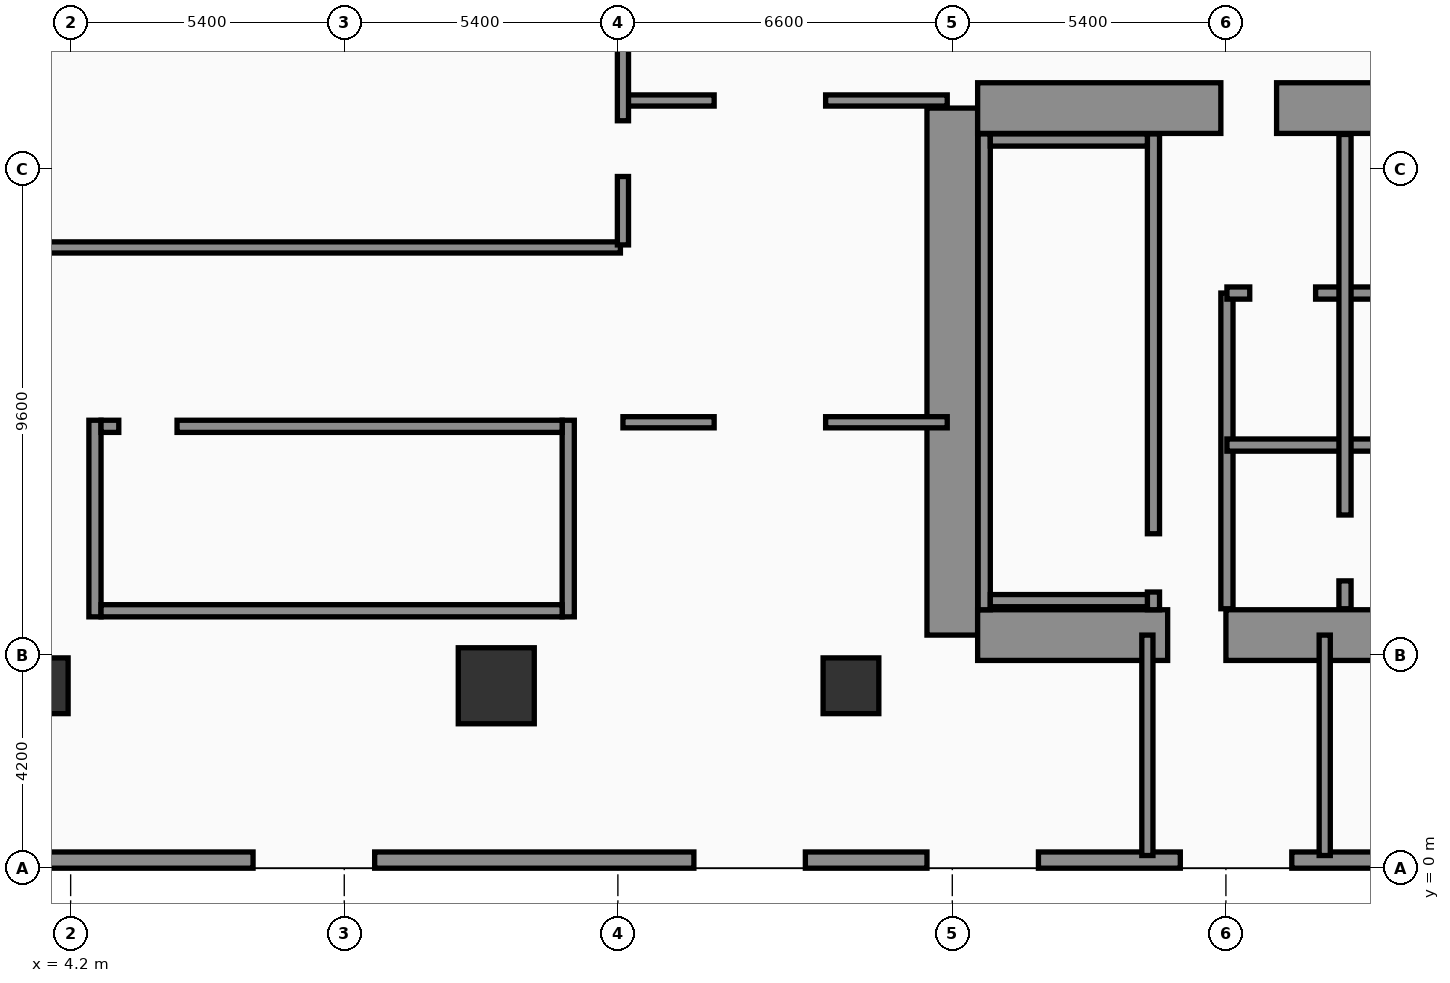
"""IFC4 building model, lengths in metres.
Left out: names, types, materials, properties, quantities, classifications, styles, units other than length and angle.
Written with IfcOpenShell. Run it as: python <this file> out.ifc"""

import sys

from ifc_helpers import new_model, si_unit, direction, frame, frame_2d, origin, origin_2d, place, context, subcontext, project, spatial, rectangle, hollow_rectangle, extrude, element, fill, save


model = new_model("IFC4")
c1 = context("Model", 3, precision=1e-05, world=origin(), true_north=direction((0.0, 1.0)))
c2 = subcontext(c1, "Body", "Model", "MODEL_VIEW")
j1 = project(units=[si_unit("LENGTHUNIT", "METRE"), si_unit("PLANEANGLEUNIT", "RADIAN")], contexts=[c1])
p1 = place(None, origin())
s1 = spatial("IfcSite", under=j1, at=p1, CompositionType="ELEMENT")
p2 = place(p1, origin())
s2 = spatial("IfcBuilding", under=s1, at=p2, CompositionType="ELEMENT")
p3 = place(p2, origin())
s3 = spatial("IfcBuildingStorey", under=s2, at=p3, CompositionType="ELEMENT", Elevation=0.0)
p4 = place(p3, frame((21.6, 4.6, 0.0), z_axis=(0.0, 0.0, 1.0), x_axis=(0.0, 1.0, 0.0)))
e1 = element("IfcWall", 1, at=p4, inside=s3, PredefinedType="SHEAR", context=c2, shape_type="SweptSolid", body=[
    extrude(rectangle(XDim=10.4, YDim=1.0, at=frame_2d((5.2, 0.0))), origin(), (0.0, 0.0, 1.0), 5.68),
])
p5 = place(p3, frame((22.1, 15.0, 0.0), z_axis=(0.0, 0.0, 1.0), x_axis=(1.0, 0.0, 0.0)))
e2 = element("IfcWall", 2, at=p5, inside=s3, PredefinedType="SHEAR", context=c2, shape_type="SweptSolid", body=[
    extrude(rectangle(XDim=9.8, YDim=1.0, at=frame_2d((4.9, 0.0))), origin(), (0.0, 0.0, 1.0), 5.68),
])
p6 = place(p5, frame((4.8, 0.0, 0.0)))
e3 = element("IfcOpeningElement", 3, at=p6, cuts=e2, PredefinedType="OPENING", context=c2, shape_type="SweptSolid", body=[
    extrude(rectangle(XDim=1.1, YDim=2.2, at=frame_2d((0.55, 1.1))), frame((0.0, 0.51, 0.0), z_axis=(0.0, -1.0, 0.0), x_axis=(1.0, 0.0, 0.0)), (0.0, 0.0, 1.0), 1.02),
])
p7 = place(p5, frame((7.95, 0.0, 0.0)))
e4 = element("IfcOpeningElement", 4, at=p7, cuts=e2, PredefinedType="OPENING", context=c2, shape_type="SweptSolid", body=[
    extrude(rectangle(XDim=1.3, YDim=2.35, at=frame_2d((0.65, 1.175))), frame((0.0, 0.51, 0.0), z_axis=(0.0, -1.0, 0.0), x_axis=(1.0, 0.0, 0.0)), (0.0, 0.0, 1.0), 1.02),
])
p8 = place(p3, frame((22.1, 4.6, 0.0), z_axis=(0.0, 0.0, 1.0), x_axis=(1.0, 0.0, 0.0)))
e5 = element("IfcWall", 5, at=p8, inside=s3, PredefinedType="SHEAR", context=c2, shape_type="SweptSolid", body=[
    extrude(rectangle(XDim=9.8, YDim=1.0, at=frame_2d((4.9, 0.0))), origin(), (0.0, 0.0, 1.0), 5.68),
])
p9 = place(p8, frame((3.75, 0.0, 0.0)))
e6 = element("IfcOpeningElement", 6, at=p9, cuts=e5, PredefinedType="OPENING", context=c2, shape_type="SweptSolid", body=[
    extrude(rectangle(XDim=1.15, YDim=2.2, at=frame_2d((0.575, 1.1))), frame((0.0, 0.51, 0.0), z_axis=(0.0, -1.0, 0.0), x_axis=(1.0, 0.0, 0.0)), (0.0, 0.0, 1.0), 1.02),
])
p10 = place(p3, frame((22.23, 5.1, 0.0), z_axis=(0.0, 0.0, 1.0), x_axis=(0.0, 1.0, 0.0)))
e7 = element("IfcWall", 7, at=p10, inside=s3, PredefinedType="SOLIDWALL", context=c2, shape_type="SweptSolid", body=[
    extrude(rectangle(XDim=9.39, YDim=0.24, at=frame_2d((4.695, 0.0))), origin(), (0.0, 0.0, 1.0), 5.68),
])
p11 = place(p3, frame((25.57, 5.1, 0.0), z_axis=(0.0, 0.0, 1.0), x_axis=(0.0, 1.0, 0.0)))
e8 = element("IfcWall", 8, at=p11, inside=s3, PredefinedType="SOLIDWALL", context=c2, shape_type="SweptSolid", body=[
    extrude(rectangle(XDim=9.39, YDim=0.24, at=frame_2d((4.695, 0.0))), origin(), (0.0, 0.0, 1.0), 5.68),
])
p12 = place(p11, frame((0.35, 0.0, 0.0)))
e9 = element("IfcOpeningElement", 9, at=p12, cuts=e8, PredefinedType="OPENING", context=c2, shape_type="SweptSolid", body=[
    extrude(rectangle(XDim=1.15, YDim=2.2, at=frame_2d((0.575, 1.1))), frame((0.0, 0.13, 0.0), z_axis=(0.0, -1.0, 0.0), x_axis=(1.0, 0.0, 0.0)), (0.0, 0.0, 1.0), 0.26),
])
for number, where, z_axis, x_axis in (
    (10, (22.35, 5.28, 0.0), (0.0, 0.0, 1.0), (1.0, 0.0, 0.0)),
    (11, (22.35, 14.37, 0.0), (0.0, 0.0, 1.0), (1.0, 0.0, 0.0)),
):
    element("IfcWall", number, at=place(p3, frame(where, z_axis=z_axis, x_axis=x_axis)), inside=s3, PredefinedType="SOLIDWALL", context=c2, shape_type="SweptSolid", body=[
        extrude(rectangle(XDim=3.1, YDim=0.24, at=frame_2d((1.55, 0.0))), origin(), (0.0, 0.0, 1.0), 5.68),
    ])
for number, where, z_axis, x_axis in (
    (12, (4.68, 4.96, 0.0), (0.0, 0.0, 1.0), (0.0, 1.0, 0.0)),
    (13, (14.02, 4.96, 0.0), (0.0, 0.0, 1.0), (0.0, 1.0, 0.0)),
):
    element("IfcWall", number, at=place(p3, frame(where, z_axis=z_axis, x_axis=x_axis)), inside=s3, PredefinedType="SOLIDWALL", context=c2, shape_type="SweptSolid", body=[
        extrude(rectangle(XDim=3.88, YDim=0.24, at=frame_2d((1.94, 0.0))), origin(), (0.0, 0.0, 1.0), 5.68),
    ])
p13 = place(p3, frame((4.8, 5.08, 0.0), z_axis=(0.0, 0.0, 1.0), x_axis=(1.0, 0.0, 0.0)))
e14 = element("IfcWall", 14, at=p13, inside=s3, PredefinedType="SOLIDWALL", context=c2, shape_type="SweptSolid", body=[
    extrude(rectangle(XDim=9.1, YDim=0.24, at=frame_2d((4.55, 0.0))), origin(), (0.0, 0.0, 1.0), 5.68),
])
p14 = place(p3, frame((4.8, 8.72, 0.0), z_axis=(0.0, 0.0, 1.0), x_axis=(1.0, 0.0, 0.0)))
e15 = element("IfcWall", 15, at=p14, inside=s3, PredefinedType="SOLIDWALL", context=c2, shape_type="SweptSolid", body=[
    extrude(rectangle(XDim=9.1, YDim=0.24, at=frame_2d((4.55, 0.0))), origin(), (0.0, 0.0, 1.0), 5.68),
])
p15 = place(p14, frame((0.35, 0.0, 0.0)))
e16 = element("IfcOpeningElement", 16, at=p15, cuts=e15, PredefinedType="OPENING", context=c2, shape_type="SweptSolid", body=[
    extrude(rectangle(XDim=1.15, YDim=2.2, at=frame_2d((0.575, 1.1))), frame((0.0, 0.13, 0.0), z_axis=(0.0, -1.0, 0.0), x_axis=(1.0, 0.0, 0.0)), (0.0, 0.0, 1.0), 0.26),
])
p16 = place(p3, frame((3.6, 3.6, 0.0), z_axis=(0.0, 0.0, 1.0), x_axis=(1.0, 0.0, 0.0)))
e17 = element("IfcColumn", 17, at=p16, inside=s3, PredefinedType="COLUMN", context=c2, shape_type="SweptSolid", body=[
    extrude(hollow_rectangle(XDim=1.1, YDim=1.1, WallThickness=0.045, at=origin_2d()), origin(), (0.0, 0.0, 1.0), 5.68),
])
p17 = place(p3, frame((12.6, 3.6, 0.0), z_axis=(0.0, 0.0, 1.0), x_axis=(1.0, 0.0, 0.0)))
e18 = element("IfcColumn", 18, at=p17, inside=s3, PredefinedType="COLUMN", context=c2, shape_type="SweptSolid", body=[
    extrude(rectangle(XDim=1.5, YDim=1.5, at=origin_2d()), origin(), (0.0, 0.0, 1.0), 5.68),
])
p18 = place(p3, frame((19.6, 3.6, 0.0), z_axis=(0.0, 0.0, 1.0), x_axis=(1.0, 0.0, 0.0)))
e19 = element("IfcColumn", 19, at=p18, inside=s3, PredefinedType="COLUMN", context=c2, shape_type="SweptSolid", body=[
    extrude(hollow_rectangle(XDim=1.1, YDim=1.1, WallThickness=0.045, at=origin_2d()), origin(), (0.0, 0.0, 1.0), 5.68),
])
p19 = place(p3, frame((81.7, 0.16, 0.0), z_axis=(0.0, 0.0, 1.0), x_axis=(-1.0, 0.0, 0.0)))
e20 = element("IfcWall", 20, at=p19, inside=s3, PredefinedType="SOLIDWALL", context=c2, shape_type="SweptSolid", body=[
    extrude(rectangle(XDim=79.4, YDim=0.32, at=frame_2d((39.7, 0.0))), origin(), (0.0, 0.0, 1.0), 5.68),
])
p20 = place(p19, frame((63.0, 0.0, 0.0)))
e21 = element("IfcOpeningElement", 21, at=p20, cuts=e20, PredefinedType="OPENING", context=c2, shape_type="SweptSolid", body=[
    extrude(rectangle(XDim=2.2, YDim=2.5, at=frame_2d((1.1, 1.25))), frame((0.0, 0.17, 0.0), z_axis=(0.0, -1.0, 0.0), x_axis=(1.0, 0.0, 0.0)), (0.0, 0.0, 1.0), 0.34),
])
p21 = place(p19, frame((58.4, 0.0, 0.0)))
e22 = element("IfcOpeningElement", 22, at=p21, cuts=e20, PredefinedType="OPENING", context=c2, shape_type="SweptSolid", body=[
    extrude(rectangle(XDim=2.2, YDim=2.5, at=frame_2d((1.1, 1.25))), frame((0.0, 0.17, 0.0), z_axis=(0.0, -1.0, 0.0), x_axis=(1.0, 0.0, 0.0)), (0.0, 0.0, 1.0), 0.34),
])
p22 = place(p19, frame((53.4, 0.0, 0.0)))
e23 = element("IfcOpeningElement", 23, at=p22, cuts=e20, PredefinedType="OPENING", context=c2, shape_type="SweptSolid", body=[
    extrude(rectangle(XDim=2.2, YDim=2.5, at=frame_2d((1.1, 1.25))), frame((0.0, 0.17, 0.0), z_axis=(0.0, -1.0, 0.0), x_axis=(1.0, 0.0, 0.0)), (0.0, 0.0, 1.0), 0.34),
])
p23 = place(p19, frame((47.0, 0.0, 0.0)))
e24 = element("IfcOpeningElement", 24, at=p23, cuts=e20, PredefinedType="OPENING", context=c2, shape_type="SweptSolid", body=[
    extrude(rectangle(XDim=2.2, YDim=2.5, at=frame_2d((1.1, 1.25))), frame((0.0, 0.17, 0.0), z_axis=(0.0, -1.0, 0.0), x_axis=(1.0, 0.0, 0.0)), (0.0, 0.0, 1.0), 0.34),
])
p24 = place(p19, frame((41.7, 0.0, 0.0)))
e25 = element("IfcOpeningElement", 25, at=p24, cuts=e20, PredefinedType="OPENING", context=c2, shape_type="SweptSolid", body=[
    extrude(rectangle(XDim=2.2, YDim=2.5, at=frame_2d((1.1, 1.25))), frame((0.0, 0.17, 0.0), z_axis=(0.0, -1.0, 0.0), x_axis=(1.0, 0.0, 0.0)), (0.0, 0.0, 1.0), 0.34),
])
p25 = place(p19, frame((36.0, 0.0, 0.0)))
e26 = element("IfcOpeningElement", 26, at=p25, cuts=e20, PredefinedType="OPENING", context=c2, shape_type="SweptSolid", body=[
    extrude(rectangle(XDim=2.2, YDim=2.5, at=frame_2d((1.1, 1.25))), frame((0.0, 0.17, 0.0), z_axis=(0.0, -1.0, 0.0), x_axis=(1.0, 0.0, 0.0)), (0.0, 0.0, 1.0), 0.34),
])
p26 = place(p19, frame((30.2, 0.0, 0.0)))
e27 = element("IfcOpeningElement", 27, at=p26, cuts=e20, PredefinedType="OPENING", context=c2, shape_type="SweptSolid", body=[
    extrude(rectangle(XDim=2.2, YDim=2.5, at=frame_2d((1.1, 1.25))), frame((0.0, 0.17, 0.0), z_axis=(0.0, -1.0, 0.0), x_axis=(1.0, 0.0, 0.0)), (0.0, 0.0, 1.0), 0.34),
])
p27 = place(p19, frame((24.7, 0.0, 0.0)))
e28 = element("IfcOpeningElement", 28, at=p27, cuts=e20, PredefinedType="OPENING", context=c2, shape_type="SweptSolid", body=[
    extrude(rectangle(XDim=2.2, YDim=2.5, at=frame_2d((1.1, 1.25))), frame((0.0, 0.17, 0.0), z_axis=(0.0, -1.0, 0.0), x_axis=(1.0, 0.0, 0.0)), (0.0, 0.0, 1.0), 0.34),
])
p28 = place(p19, frame((71.5, 0.0, 0.8)))
e29 = element("IfcOpeningElement", 29, at=p28, cuts=e20, PredefinedType="OPENING", context=c2, shape_type="SweptSolid", body=[
    extrude(rectangle(XDim=2.4, YDim=2.6, at=frame_2d((1.2, 1.3))), frame((0.0, 0.17, 0.0), z_axis=(0.0, -1.0, 0.0), x_axis=(1.0, 0.0, 0.0)), (0.0, 0.0, 1.0), 0.34),
])
p29 = place(p19, frame((16.5, 0.0, 0.8)))
e30 = element("IfcOpeningElement", 30, at=p29, cuts=e20, PredefinedType="OPENING", context=c2, shape_type="SweptSolid", body=[
    extrude(rectangle(XDim=2.4, YDim=2.6, at=frame_2d((1.2, 1.3))), frame((0.0, 0.17, 0.0), z_axis=(0.0, -1.0, 0.0), x_axis=(1.0, 0.0, 0.0)), (0.0, 0.0, 1.0), 0.34),
])
p30 = place(p19, frame((7.0, 0.0, 0.8)))
e31 = element("IfcOpeningElement", 31, at=p30, cuts=e20, PredefinedType="OPENING", context=c2, shape_type="SweptSolid", body=[
    extrude(rectangle(XDim=2.4, YDim=2.6, at=frame_2d((1.2, 1.3))), frame((0.0, 0.17, 0.0), z_axis=(0.0, -1.0, 0.0), x_axis=(1.0, 0.0, 0.0)), (0.0, 0.0, 1.0), 0.34),
])
p31 = place(p3, frame((27.02, 5.12, 0.0), z_axis=(0.0, 0.0, 1.0), x_axis=(0.0, 1.0, 0.0)))
e32 = element("IfcWall", 32, at=p31, inside=s3, PredefinedType="SOLIDWALL", context=c2, shape_type="SweptSolid", body=[
    extrude(rectangle(XDim=6.23, YDim=0.24, at=frame_2d((3.115, 0.0))), origin(), (0.0, 0.0, 1.0), 5.68),
])
p32 = place(p3, frame((27.02, 11.35, 0.0), z_axis=(0.0, 0.0, 1.0), x_axis=(1.0, 0.0, 0.0)))
e33 = element("IfcWall", 33, at=p32, inside=s3, PredefinedType="SOLIDWALL", context=c2, shape_type="SweptSolid", body=[
    extrude(rectangle(XDim=4.86, YDim=0.24, at=frame_2d((2.43, 0.0))), origin(), (0.0, 0.0, 1.0), 5.68),
])
p33 = place(p32, frame((0.45, 0.0, 0.0)))
e34 = element("IfcOpeningElement", 34, at=p33, cuts=e33, PredefinedType="OPENING", context=c2, shape_type="SweptSolid", body=[
    extrude(rectangle(XDim=1.3, YDim=2.35, at=frame_2d((0.65, 1.175))), frame((0.0, 0.13, 0.0), z_axis=(0.0, -1.0, 0.0), x_axis=(1.0, 0.0, 0.0)), (0.0, 0.0, 1.0), 0.26),
])
p34 = place(p3, frame((27.02, 8.35, 0.0), z_axis=(0.0, 0.0, 1.0), x_axis=(1.0, 0.0, 0.0)))
e35 = element("IfcWall", 35, at=p34, inside=s3, PredefinedType="SOLIDWALL", context=c2, shape_type="SweptSolid", body=[
    extrude(rectangle(XDim=4.86, YDim=0.24, at=frame_2d((2.43, 0.0))), origin(), (0.0, 0.0, 1.0), 5.68),
])
p35 = place(p3, frame((29.35, 5.12, 0.0), z_axis=(0.0, 0.0, 1.0), x_axis=(0.0, 1.0, 0.0)))
e36 = element("IfcWall", 36, at=p35, inside=s3, PredefinedType="SOLIDWALL", context=c2, shape_type="SweptSolid", body=[
    extrude(rectangle(XDim=9.36, YDim=0.24, at=frame_2d((4.68, 0.0))), origin(), (0.0, 0.0, 1.0), 5.68),
])
p36 = place(p35, frame((0.55, 0.0, 0.0)))
e37 = element("IfcOpeningElement", 37, at=p36, cuts=e36, PredefinedType="OPENING", context=c2, shape_type="SweptSolid", body=[
    extrude(rectangle(XDim=1.3, YDim=2.35, at=frame_2d((0.65, 1.175))), frame((0.0, 0.13, 0.0), z_axis=(0.0, -1.0, 0.0), x_axis=(1.0, 0.0, 0.0)), (0.0, 0.0, 1.0), 0.26),
])
p37 = place(p3, frame((0.06, 12.25, 0.0), z_axis=(0.0, 0.0, 1.0), x_axis=(1.0, 0.0, 0.0)))
e38 = element("IfcWall", 38, at=p37, inside=s3, PredefinedType="SOLIDWALL", context=c2, shape_type="SweptSolid", body=[
    extrude(rectangle(XDim=14.99, YDim=0.22, at=frame_2d((7.495, 0.0))), origin(), (0.0, 0.0, 1.0), 4.88),
])
p38 = place(p3, frame((15.1, 15.15, 0.0), z_axis=(0.0, 0.0, 1.0), x_axis=(1.0, 0.0, 0.0)))
e39 = element("IfcWall", 39, at=p38, inside=s3, PredefinedType="SOLIDWALL", context=c2, shape_type="SweptSolid", body=[
    extrude(rectangle(XDim=6.4, YDim=0.22, at=frame_2d((3.2, 0.0))), origin(), (0.0, 0.0, 1.0), 4.48),
])
p39 = place(p38, frame((1.8, 0.0, 0.0)))
e40 = element("IfcOpeningElement", 40, at=p39, cuts=e39, PredefinedType="OPENING", context=c2, shape_type="SweptSolid", body=[
    extrude(rectangle(XDim=2.2, YDim=2.5, at=frame_2d((1.1, 1.25))), frame((0.0, 0.12, 0.0), z_axis=(0.0, -1.0, 0.0), x_axis=(1.0, 0.0, 0.0)), (0.0, 0.0, 1.0), 0.24),
])
p40 = place(p3, frame((15.1, 8.8, 0.0), z_axis=(0.0, 0.0, 1.0), x_axis=(1.0, 0.0, 0.0)))
e41 = element("IfcWall", 41, at=p40, inside=s3, PredefinedType="SOLIDWALL", context=c2, shape_type="SweptSolid", body=[
    extrude(rectangle(XDim=6.4, YDim=0.22, at=frame_2d((3.2, 0.0))), origin(), (0.0, 0.0, 1.0), 5.68),
])
p41 = place(p40, frame((1.8, 0.0, 0.0)))
e42 = element("IfcOpeningElement", 42, at=p41, cuts=e41, PredefinedType="OPENING", context=c2, shape_type="SweptSolid", body=[
    extrude(rectangle(XDim=2.2, YDim=2.5, at=frame_2d((1.1, 1.25))), frame((0.0, 0.12, 0.0), z_axis=(0.0, -1.0, 0.0), x_axis=(1.0, 0.0, 0.0)), (0.0, 0.0, 1.0), 0.24),
])
for number, where, z_axis, x_axis in (
    (43, (25.45, 0.25, 0.0), (0.0, 0.0, 1.0), (0.0, 1.0, 0.0)),
    (44, (28.95, 0.25, 0.0), (0.0, 0.0, 1.0), (0.0, 1.0, 0.0)),
):
    element("IfcWall", number, at=place(p3, frame(where, z_axis=z_axis, x_axis=x_axis)), inside=s3, PredefinedType="SOLIDWALL", context=c2, shape_type="SweptSolid", body=[
        extrude(rectangle(XDim=4.35, YDim=0.22, at=frame_2d((2.175, 0.0))), origin(), (0.0, 0.0, 1.0), 5.18),
    ])
p42 = place(p3, frame((15.1, 12.3, 0.0), z_axis=(0.0, 0.0, 1.0), x_axis=(0.0, 1.0, 0.0)))
e45 = element("IfcWall", 45, at=p42, inside=s3, PredefinedType="SOLIDWALL", context=c2, shape_type="SweptSolid", body=[
    extrude(rectangle(XDim=4.3, YDim=0.22, at=frame_2d((2.15, 0.0))), origin(), (0.0, 0.0, 1.0), 4.48),
])
p43 = place(p42, frame((1.35, 0.0, 0.0)))
e46 = element("IfcOpeningElement", 46, at=p43, cuts=e45, PredefinedType="OPENING", context=c2, shape_type="SweptSolid", body=[
    extrude(rectangle(XDim=1.1, YDim=2.2, at=frame_2d((0.55, 1.1))), frame((0.0, 0.12, 0.0), z_axis=(0.0, -1.0, 0.0), x_axis=(1.0, 0.0, 0.0)), (0.0, 0.0, 1.0), 0.24),
])
p44 = place(p20, origin())
e47 = element("IfcDoor", 47, at=p44, inside=s3, OperationType="DOUBLE_DOOR_SINGLE_SWING", PredefinedType="DOOR", context=c2, shape_type="SweptSolid", body=[
    extrude(rectangle(XDim=2.2, YDim=2.5, at=frame_2d((1.1, 1.25))), frame((0.0, 0.025, 0.0), z_axis=(0.0, -1.0, 0.0), x_axis=(1.0, 0.0, 0.0)), (0.0, 0.0, 1.0), 0.05),
])
fill(e21, e47)
p45 = place(p21, origin())
e48 = element("IfcDoor", 48, at=p45, inside=s3, OperationType="DOUBLE_DOOR_SINGLE_SWING", PredefinedType="DOOR", context=c2, shape_type="SweptSolid", body=[
    extrude(rectangle(XDim=2.2, YDim=2.5, at=frame_2d((1.1, 1.25))), frame((0.0, 0.025, 0.0), z_axis=(0.0, -1.0, 0.0), x_axis=(1.0, 0.0, 0.0)), (0.0, 0.0, 1.0), 0.05),
])
fill(e22, e48)
p46 = place(p22, origin())
e49 = element("IfcDoor", 49, at=p46, inside=s3, OperationType="DOUBLE_DOOR_SINGLE_SWING", PredefinedType="DOOR", context=c2, shape_type="SweptSolid", body=[
    extrude(rectangle(XDim=2.2, YDim=2.5, at=frame_2d((1.1, 1.25))), frame((0.0, 0.025, 0.0), z_axis=(0.0, -1.0, 0.0), x_axis=(1.0, 0.0, 0.0)), (0.0, 0.0, 1.0), 0.05),
])
fill(e23, e49)
p47 = place(p28, origin())
e50 = element("IfcWindow", 50, at=p47, inside=s3, PartitioningType="SINGLE_PANEL", PredefinedType="WINDOW", context=c2, shape_type="SweptSolid", body=[
    extrude(rectangle(XDim=2.4, YDim=2.6, at=frame_2d((1.2, 1.3))), frame((0.0, 0.03, 0.0), z_axis=(0.0, -1.0, 0.0), x_axis=(1.0, 0.0, 0.0)), (0.0, 0.0, 1.0), 0.06),
])
fill(e29, e50)
p48 = place(p33, origin())
e51 = element("IfcDoor", 51, at=p48, inside=s3, OperationType="DOUBLE_DOOR_SLIDING", PredefinedType="DOOR", context=c2, shape_type="SweptSolid", body=[
    extrude(rectangle(XDim=1.3, YDim=2.35, at=frame_2d((0.65, 1.175))), frame((0.0, 0.025, 0.0), z_axis=(0.0, -1.0, 0.0), x_axis=(1.0, 0.0, 0.0)), (0.0, 0.0, 1.0), 0.05),
])
fill(e34, e51)
p49 = place(p36, origin())
e52 = element("IfcDoor", 52, at=p49, inside=s3, OperationType="DOUBLE_DOOR_SLIDING", PredefinedType="DOOR", context=c2, shape_type="SweptSolid", body=[
    extrude(rectangle(XDim=1.3, YDim=2.35, at=frame_2d((0.65, 1.175))), frame((0.0, 0.025, 0.0), z_axis=(0.0, -1.0, 0.0), x_axis=(1.0, 0.0, 0.0)), (0.0, 0.0, 1.0), 0.05),
])
fill(e37, e52)
p50 = place(p39, origin())
e53 = element("IfcDoor", 53, at=p50, inside=s3, OperationType="DOUBLE_DOOR_SINGLE_SWING", PredefinedType="DOOR", context=c2, shape_type="SweptSolid", body=[
    extrude(rectangle(XDim=2.2, YDim=2.5, at=frame_2d((1.1, 1.25))), frame((0.0, 0.025, 0.0), z_axis=(0.0, -1.0, 0.0), x_axis=(1.0, 0.0, 0.0)), (0.0, 0.0, 1.0), 0.05),
])
fill(e40, e53)
p51 = place(p41, origin())
e54 = element("IfcDoor", 54, at=p51, inside=s3, OperationType="DOUBLE_DOOR_SINGLE_SWING", PredefinedType="DOOR", context=c2, shape_type="SweptSolid", body=[
    extrude(rectangle(XDim=2.2, YDim=2.5, at=frame_2d((1.1, 1.25))), frame((0.0, 0.025, 0.0), z_axis=(0.0, -1.0, 0.0), x_axis=(1.0, 0.0, 0.0)), (0.0, 0.0, 1.0), 0.05),
])
fill(e42, e54)
p52 = place(p43, origin())
e55 = element("IfcDoor", 55, at=p52, inside=s3, OperationType="SINGLE_SWING_LEFT", PredefinedType="DOOR", context=c2, shape_type="SweptSolid", body=[
    extrude(rectangle(XDim=1.1, YDim=2.2, at=frame_2d((0.55, 1.1))), frame((0.0, 0.025, 0.0), z_axis=(0.0, -1.0, 0.0), x_axis=(1.0, 0.0, 0.0)), (0.0, 0.0, 1.0), 0.05),
])
fill(e46, e55)
p53 = place(p12, origin())
e56 = element("IfcDoor", 56, at=p53, inside=s3, OperationType="SINGLE_SWING_RIGHT", PredefinedType="DOOR", context=c2, shape_type="SweptSolid", body=[
    extrude(rectangle(XDim=1.15, YDim=2.2, at=frame_2d((0.575, 1.1))), frame((0.0, 0.025, 0.0), z_axis=(0.0, -1.0, 0.0), x_axis=(1.0, 0.0, 0.0)), (0.0, 0.0, 1.0), 0.05),
])
fill(e9, e56)
p54 = place(p15, origin())
e57 = element("IfcDoor", 57, at=p54, inside=s3, OperationType="SINGLE_SWING_RIGHT", PredefinedType="DOOR", context=c2, shape_type="SweptSolid", body=[
    extrude(rectangle(XDim=1.15, YDim=2.2, at=frame_2d((0.575, 1.1))), frame((0.0, 0.025, 0.0), z_axis=(0.0, -1.0, 0.0), x_axis=(1.0, 0.0, 0.0)), (0.0, 0.0, 1.0), 0.05),
])
fill(e16, e57)
p55 = place(p9, origin())
e58 = element("IfcDoor", 58, at=p55, inside=s3, OperationType="SINGLE_SWING_RIGHT", PredefinedType="DOOR", context=c2, shape_type="SweptSolid", body=[
    extrude(rectangle(XDim=1.15, YDim=2.2, at=frame_2d((0.575, 1.1))), frame((0.0, 0.025, 0.0), z_axis=(0.0, -1.0, 0.0), x_axis=(1.0, 0.0, 0.0)), (0.0, 0.0, 1.0), 0.05),
])
fill(e6, e58)
p56 = place(p6, origin())
e59 = element("IfcDoor", 59, at=p56, inside=s3, OperationType="SINGLE_SWING_RIGHT", PredefinedType="DOOR", context=c2, shape_type="SweptSolid", body=[
    extrude(rectangle(XDim=1.1, YDim=2.2, at=frame_2d((0.55, 1.1))), frame((0.0, 0.025, 0.0), z_axis=(0.0, -1.0, 0.0), x_axis=(1.0, 0.0, 0.0)), (0.0, 0.0, 1.0), 0.05),
])
fill(e3, e59)
save(model, sys.argv[1])
